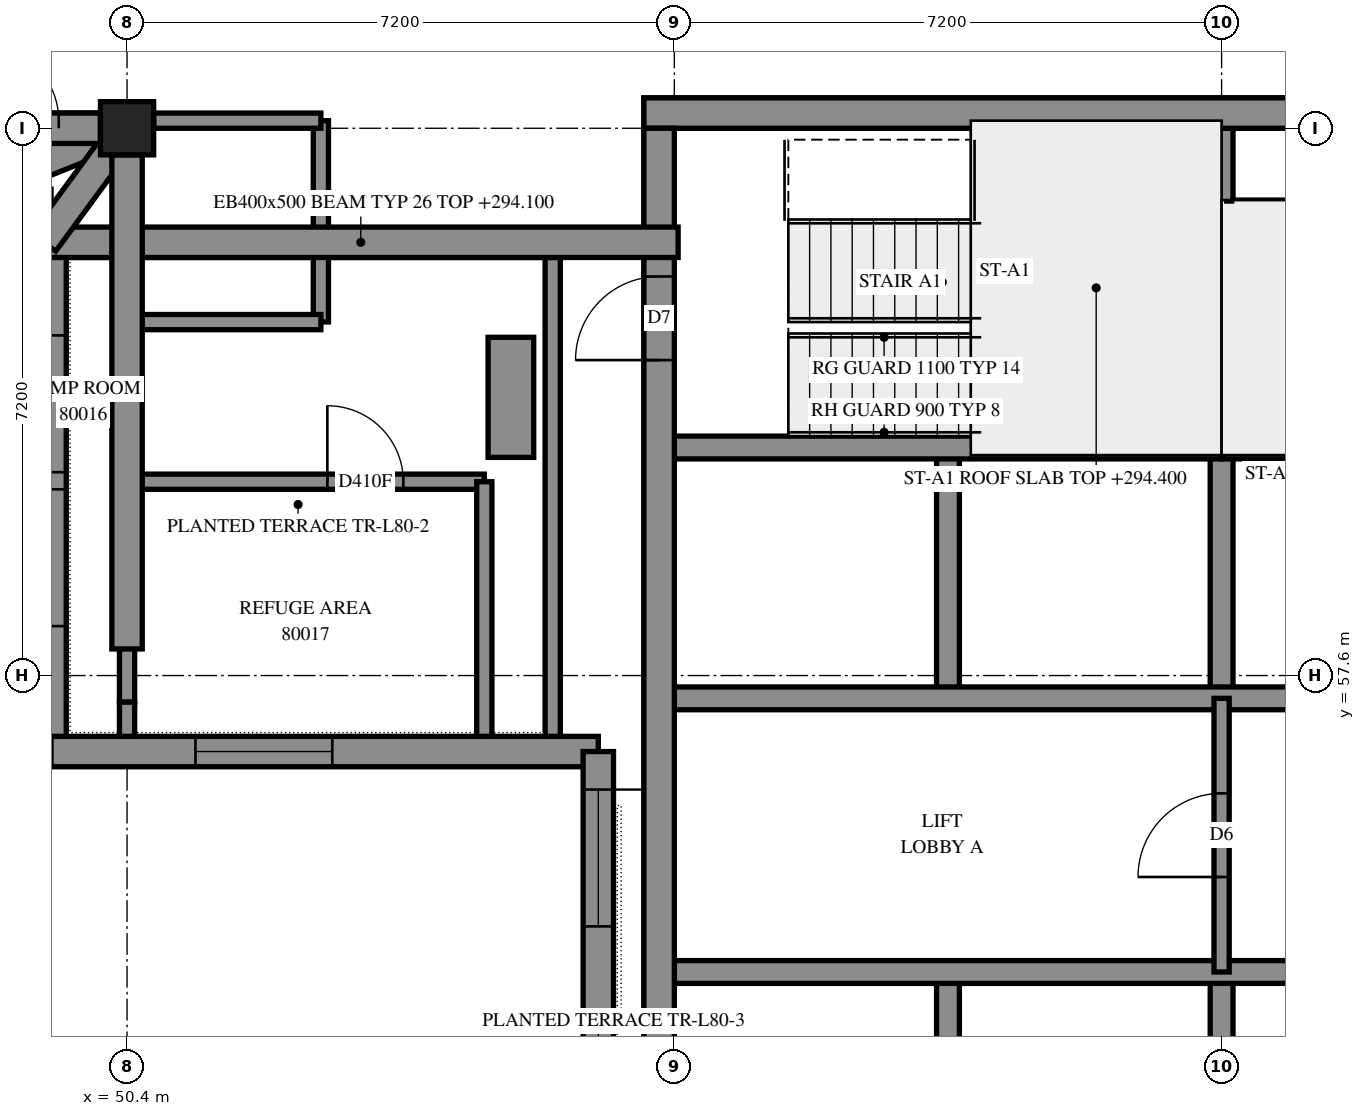
"""IFC4 building model, lengths in metres.
Left out: names, types, materials, properties, quantities, classifications, styles, units other than length and angle.
Written with IfcOpenShell. Run it as: python <this file> out.ifc"""

import sys

from ifc_helpers import new_model, si_unit, direction, frame, frame_2d, origin, origin_2d, place, context, subcontext, project, spatial, polyline, rectangle, outline, extrude, element, fill, save


model = new_model("IFC4")
c1 = context("Model", 3, precision=1e-05, world=origin(), true_north=direction((0.0, 1.0)))
c2 = subcontext(c1, "Body", "Model", "MODEL_VIEW")
j1 = project(units=[si_unit("LENGTHUNIT", "METRE"), si_unit("PLANEANGLEUNIT", "RADIAN")], contexts=[c1])
p1 = place(None, origin())
s1 = spatial("IfcSite", under=j1, at=p1, CompositionType="ELEMENT")
p2 = place(p1, origin())
s2 = spatial("IfcBuilding", under=s1, at=p2, CompositionType="ELEMENT")
p3 = place(p2, frame((0.0, 0.0, 294.4)))
s3 = spatial("IfcBuildingStorey", under=s2, at=p3, CompositionType="ELEMENT", Elevation=294.4)
p4 = place(p3, frame((50.4, 64.8, 0.0), z_axis=(0.0, 0.0, 1.0), x_axis=(1.0, 0.0, 0.0)))
e1 = element("IfcColumn", 1, at=p4, inside=s3, PredefinedType="COLUMN", context=c2, shape_type="SweptSolid", body=[
    extrude(rectangle(XDim=0.7, YDim=0.7, at=origin_2d()), origin(), (0.0, 0.0, 1.0), 3.5),
])
p5 = place(p3, frame((57.2, 65.0, -0.3), z_axis=(0.0, 0.0, 1.0), x_axis=(1.0, 0.0, 0.0)))
e2 = element("IfcWall", 2, at=p5, inside=s3, PredefinedType="SHEAR", context=c2, shape_type="SweptSolid", body=[
    extrude(outline(polyline([(0.0, 0.0), (15.2, 0.0), (15.2, 3.1), (0.0, 3.1), (0.0, 0.0)])), frame((0.0, 0.2, 0.0), z_axis=(0.0, -1.0, 0.0), x_axis=(1.0, 0.0, 0.0)), (0.0, 0.0, 1.0), 0.4),
])
p6 = place(p5, frame((10.4, 0.0, 0.3)))
e3 = element("IfcOpeningElement", 3, at=p6, cuts=e2, PredefinedType="OPENING", context=c2, shape_type="SweptSolid", body=[
    extrude(rectangle(XDim=0.8, YDim=2.1, at=frame_2d((0.4, 1.05))), frame((0.0, 0.21, 0.0), z_axis=(0.0, -1.0, 0.0), x_axis=(1.0, 0.0, 0.0)), (0.0, 0.0, 1.0), 0.42),
])
p7 = place(p3, frame((57.4, 50.4, -0.3), z_axis=(0.0, 0.0, 1.0), x_axis=(0.0, 1.0, 0.0)))
e4 = element("IfcWall", 4, at=p7, inside=s3, PredefinedType="SHEAR", context=c2, shape_type="SweptSolid", body=[
    extrude(outline(polyline([(0.0, 0.0), (14.4, 0.0), (14.4, 3.1), (0.0, 3.1), (0.0, 0.0)])), frame((0.0, 0.2, 0.0), z_axis=(0.0, -1.0, 0.0), x_axis=(1.0, 0.0, 0.0)), (0.0, 0.0, 1.0), 0.4),
])
p8 = place(p7, frame((11.35, 0.0, 0.3)))
e5 = element("IfcOpeningElement", 5, at=p8, cuts=e4, PredefinedType="OPENING", context=c2, shape_type="SweptSolid", body=[
    extrude(rectangle(XDim=1.1, YDim=2.1, at=frame_2d((0.55, 1.05))), frame((0.0, 0.21, 0.0), z_axis=(0.0, -1.0, 0.0), x_axis=(1.0, 0.0, 0.0)), (0.0, 0.0, 1.0), 0.42),
])
for number, where, z_axis, x_axis in (
    (6, (61.2, 50.4, 0.0), (0.0, 0.0, 1.0), (0.0, 1.0, 0.0)),
    (7, (61.2, 57.3, 0.0), (0.0, 0.0, 1.0), (0.0, 1.0, 0.0)),
    (8, (64.8, 50.4, 0.0), (0.0, 0.0, 1.0), (0.0, 1.0, 0.0)),
    (9, (64.8, 57.3, 0.0), (0.0, 0.0, 1.0), (0.0, 1.0, 0.0)),
):
    element("IfcWall", number, at=place(p3, frame(where, z_axis=z_axis, x_axis=x_axis)), inside=s3, PredefinedType="SOLIDWALL", context=c2, shape_type="SweptSolid", body=[
        extrude(outline(polyline([(0.0, 0.0), (3.3, 0.0), (3.3, 3.5), (0.0, 3.5), (0.0, 0.0)])), frame((0.0, 0.15, 0.0), z_axis=(0.0, -1.0, 0.0), x_axis=(1.0, 0.0, 0.0)), (0.0, 0.0, 1.0), 0.3),
    ])
p9 = place(p3, frame((57.6, 53.7, 0.0), z_axis=(0.0, 0.0, 1.0), x_axis=(1.0, 0.0, 0.0)))
e10 = element("IfcWall", 10, at=p9, inside=s3, PredefinedType="SOLIDWALL", context=c2, shape_type="SweptSolid", body=[
    extrude(outline(polyline([(0.0, 0.0), (14.4, 0.0), (14.4, 3.5), (0.0, 3.5), (0.0, 0.0)])), frame((0.0, 0.15, 0.0), z_axis=(0.0, -1.0, 0.0), x_axis=(1.0, 0.0, 0.0)), (0.0, 0.0, 1.0), 0.3),
])
p10 = place(p9, frame((12.05, 0.0, 0.0)))
e11 = element("IfcOpeningElement", 11, at=p10, cuts=e10, PredefinedType="OPENING", context=c2, shape_type="SweptSolid", body=[
    extrude(rectangle(XDim=1.1, YDim=2.1, at=frame_2d((0.55, 1.05))), frame((0.0, 0.16, 0.0), z_axis=(0.0, -1.0, 0.0), x_axis=(1.0, 0.0, 0.0)), (0.0, 0.0, 1.0), 0.32),
])
p11 = place(p3, frame((57.6, 57.3, 0.0), z_axis=(0.0, 0.0, 1.0), x_axis=(1.0, 0.0, 0.0)))
e12 = element("IfcWall", 12, at=p11, inside=s3, PredefinedType="SOLIDWALL", context=c2, shape_type="SweptSolid", body=[
    extrude(outline(polyline([(0.0, 0.0), (14.4, 0.0), (14.4, 3.5), (0.0, 3.5), (0.0, 0.0)])), frame((0.0, 0.15, 0.0), z_axis=(0.0, -1.0, 0.0), x_axis=(1.0, 0.0, 0.0)), (0.0, 0.0, 1.0), 0.3),
])
p12 = place(p11, frame((12.05, 0.0, 0.0)))
e13 = element("IfcOpeningElement", 13, at=p12, cuts=e12, PredefinedType="OPENING", context=c2, shape_type="SweptSolid", body=[
    extrude(rectangle(XDim=1.1, YDim=2.1, at=frame_2d((0.55, 1.05))), frame((0.0, 0.16, 0.0), z_axis=(0.0, -1.0, 0.0), x_axis=(1.0, 0.0, 0.0)), (0.0, 0.0, 1.0), 0.32),
])
for number, where, z_axis, x_axis in (
    (14, (57.6, 60.6, 0.0), (0.0, 0.0, 1.0), (1.0, 0.0, 0.0)),
    (15, (64.8, 60.6, 0.0), (0.0, 0.0, 1.0), (1.0, 0.0, 0.0)),
):
    element("IfcWall", number, at=place(p3, frame(where, z_axis=z_axis, x_axis=x_axis)), inside=s3, PredefinedType="SOLIDWALL", context=c2, shape_type="SweptSolid", body=[
        extrude(outline(polyline([(0.0, 0.0), (7.2, 0.0), (7.2, 3.5), (0.0, 3.5), (0.0, 0.0)])), frame((0.0, 0.15, 0.0), z_axis=(0.0, -1.0, 0.0), x_axis=(1.0, 0.0, 0.0)), (0.0, 0.0, 1.0), 0.3),
    ])
p13 = place(p3, frame((64.8, 60.6, 0.0), z_axis=(0.0, 0.0, 1.0), x_axis=(0.0, 1.0, 0.0)))
e16 = element("IfcWall", 16, at=p13, inside=s3, PredefinedType="SOLIDWALL", context=c2, shape_type="SweptSolid", body=[
    extrude(outline(polyline([(0.0, 0.0), (4.2, 0.0), (4.2, 3.5), (0.0, 3.5), (0.0, 0.0)])), frame((0.0, 0.15, 0.0), z_axis=(0.0, -1.0, 0.0), x_axis=(1.0, 0.0, 0.0)), (0.0, 0.0, 1.0), 0.3),
])
p14 = place(p3, frame((40.967, 63.8, 0.0), z_axis=(0.0, 0.0, 1.0), x_axis=(1.0, 0.0, 0.0)))
e17 = element("IfcWall", 17, at=p14, inside=s3, PredefinedType="SOLIDWALL", context=c2, shape_type="SweptSolid", body=[
    extrude(outline(polyline([(-0.2, -0.2), (8.233, -0.2), (8.633, 0.2), (0.2, 0.2), (-0.2, -0.2)])), origin(), (0.0, 0.0, 1.0), 3.5),
])
p15 = place(p14, frame((3.283, 0.0, 0.7)))
e18 = element("IfcOpeningElement", 18, at=p15, cuts=e17, PredefinedType="OPENING", context=c2, shape_type="SweptSolid", body=[
    extrude(rectangle(XDim=1.8, YDim=2.2, at=frame_2d((0.9, 1.1))), frame((0.0, 0.21, 0.0), z_axis=(0.0, -1.0, 0.0), x_axis=(1.0, 0.0, 0.0)), (0.0, 0.0, 1.0), 0.42),
])
p16 = place(p14, frame((6.133, 0.0, 0.7)))
e19 = element("IfcOpeningElement", 19, at=p16, cuts=e17, PredefinedType="OPENING", context=c2, shape_type="SweptSolid", body=[
    extrude(rectangle(XDim=1.8, YDim=2.2, at=frame_2d((0.9, 1.1))), frame((0.0, 0.21, 0.0), z_axis=(0.0, -1.0, 0.0), x_axis=(1.0, 0.0, 0.0)), (0.0, 0.0, 1.0), 0.42),
])
p17 = place(p3, frame((49.4, 63.8, 0.0), z_axis=(0.0, 0.0, 1.0), x_axis=(0.0, -1.0, 0.0)))
e20 = element("IfcWall", 20, at=p17, inside=s3, PredefinedType="SOLIDWALL", context=c2, shape_type="SweptSolid", body=[
    extrude(outline(polyline([(0.2, -0.2), (7.4, -0.2), (7.0, 0.2), (-0.2, 0.2), (0.2, -0.2)])), origin(), (0.0, 0.0, 1.0), 3.5),
])
p18 = place(p17, frame((3.75, 0.0, 0.7)))
e21 = element("IfcOpeningElement", 21, at=p18, cuts=e20, PredefinedType="OPENING", context=c2, shape_type="SweptSolid", body=[
    extrude(rectangle(XDim=1.8, YDim=2.2, at=frame_2d((0.9, 1.1))), frame((0.0, 0.21, 0.0), z_axis=(0.0, -1.0, 0.0), x_axis=(1.0, 0.0, 0.0)), (0.0, 0.0, 1.0), 0.42),
])
p19 = place(p17, frame((1.725, 0.0, 0.7)))
e22 = element("IfcOpeningElement", 22, at=p19, cuts=e20, PredefinedType="OPENING", context=c2, shape_type="SweptSolid", body=[
    extrude(rectangle(XDim=1.8, YDim=2.2, at=frame_2d((0.9, 1.1))), frame((0.0, 0.21, 0.0), z_axis=(0.0, -1.0, 0.0), x_axis=(1.0, 0.0, 0.0)), (0.0, 0.0, 1.0), 0.42),
])
p20 = place(p3, frame((49.4, 56.6, 0.0), z_axis=(0.0, 0.0, 1.0), x_axis=(1.0, 0.0, 0.0)))
e23 = element("IfcWall", 23, at=p20, inside=s3, PredefinedType="SOLIDWALL", context=c2, shape_type="SweptSolid", body=[
    extrude(outline(polyline([(-0.2, -0.2), (7.0, -0.2), (7.0, 0.2), (0.2, 0.2), (-0.2, -0.2)])), origin(), (0.0, 0.0, 1.0), 3.5),
])
p21 = place(p20, frame((1.9, 0.0, 0.7)))
e24 = element("IfcOpeningElement", 24, at=p21, cuts=e23, PredefinedType="OPENING", context=c2, shape_type="SweptSolid", body=[
    extrude(rectangle(XDim=1.8, YDim=2.2, at=frame_2d((0.9, 1.1))), frame((0.0, 0.21, 0.0), z_axis=(0.0, -1.0, 0.0), x_axis=(1.0, 0.0, 0.0)), (0.0, 0.0, 1.0), 0.42),
])
p22 = place(p3, frame((56.6, 56.6, 0.0), z_axis=(0.0, 0.0, 1.0), x_axis=(0.0, -1.0, 0.0)))
e25 = element("IfcWall", 25, at=p22, inside=s3, PredefinedType="SOLIDWALL", context=c2, shape_type="SweptSolid", body=[
    extrude(outline(polyline([(-0.2, -0.2), (7.4, -0.2), (7.0, 0.2), (-0.2, 0.2), (-0.2, -0.2)])), origin(), (0.0, 0.0, 1.0), 3.5),
])
p23 = place(p22, frame((0.5, 0.0, 0.7)))
e26 = element("IfcOpeningElement", 26, at=p23, cuts=e25, PredefinedType="OPENING", context=c2, shape_type="SweptSolid", body=[
    extrude(rectangle(XDim=1.8, YDim=2.2, at=frame_2d((0.9, 1.1))), frame((0.0, 0.21, 0.0), z_axis=(0.0, -1.0, 0.0), x_axis=(1.0, 0.0, 0.0)), (0.0, 0.0, 1.0), 0.42),
])
p24 = place(p22, frame((3.5, 0.0, 0.7)))
e27 = element("IfcOpeningElement", 27, at=p24, cuts=e25, PredefinedType="OPENING", context=c2, shape_type="SweptSolid", body=[
    extrude(rectangle(XDim=1.8, YDim=2.2, at=frame_2d((0.9, 1.1))), frame((0.0, 0.21, 0.0), z_axis=(0.0, -1.0, 0.0), x_axis=(1.0, 0.0, 0.0)), (0.0, 0.0, 1.0), 0.42),
])
p25 = place(p3, frame((56.0, 56.8, 0.0), z_axis=(0.0, 0.0, 1.0), x_axis=(0.0, 1.0, 0.0)))
e28 = element("IfcWall", 28, at=p25, inside=s3, PredefinedType="PARAPET", context=c2, shape_type="SweptSolid", body=[
    extrude(outline(polyline([(0.0, -0.1), (6.5, -0.1), (6.3, 0.1), (0.0, 0.1), (0.0, -0.1)])), origin(), (0.0, 0.0, 1.0), 0.25),
])
p26 = place(p3, frame((56.0, 63.2, 0.0), z_axis=(0.0, 0.0, 1.0), x_axis=(-1.0, 0.0, 0.0)))
e29 = element("IfcWall", 29, at=p26, inside=s3, PredefinedType="PARAPET", context=c2, shape_type="SweptSolid", body=[
    extrude(outline(polyline([(-0.1, -0.1), (6.4, -0.1), (6.4, 0.1), (0.1, 0.1), (-0.1, -0.1)])), origin(), (0.0, 0.0, 1.0), 0.25),
])
p27 = place(p3, frame((55.45, 60.47, 0.0), z_axis=(0.0, 0.0, 1.0), x_axis=(0.0, 1.0, 0.0)))
e30 = element("IfcWall", 30, at=p27, inside=s3, PredefinedType="SOLIDWALL", context=c2, shape_type="SweptSolid", body=[
    extrude(rectangle(XDim=1.58, YDim=0.6, at=frame_2d((0.79, 0.0))), origin(), (0.0, 0.0, 1.0), 0.65),
])
p28 = place(p3, frame((64.95, 63.78, 0.0), z_axis=(0.0, 0.0, 1.0), x_axis=(1.0, 0.0, 0.0)))
e31 = element("IfcWall", 31, at=p28, inside=s3, PredefinedType="PARTITIONING", context=c2, shape_type="SweptSolid", body=[
    extrude(outline(polyline([(0.0, 0.0), (6.9, 0.0), (6.9, 3.5), (0.0, 3.5), (0.0, 0.0)])), frame((0.0, 0.075, 0.0), z_axis=(0.0, -1.0, 0.0), x_axis=(1.0, 0.0, 0.0)), (0.0, 0.0, 1.0), 0.15),
])
p29 = place(p3, frame((64.8, 53.7, 0.0), z_axis=(0.0, 0.0, 1.0), x_axis=(0.0, 1.0, 0.0)))
e32 = element("IfcWall", 32, at=p29, inside=s3, PredefinedType="PARTITIONING", context=c2, shape_type="SweptSolid", body=[
    extrude(outline(polyline([(0.0, 0.0), (3.6, 0.0), (3.6, 3.5), (0.0, 3.5), (0.0, 0.0)])), frame((0.0, 0.1, 0.0), z_axis=(0.0, -1.0, 0.0), x_axis=(1.0, 0.0, 0.0)), (0.0, 0.0, 1.0), 0.2),
])
p30 = place(p29, frame((1.25, 0.0, 0.0)))
e33 = element("IfcOpeningElement", 33, at=p30, cuts=e32, PredefinedType="OPENING", context=c2, shape_type="SweptSolid", body=[
    extrude(rectangle(XDim=1.1, YDim=2.1, at=frame_2d((0.55, 1.05))), frame((0.0, 0.11, 0.0), z_axis=(0.0, -1.0, 0.0), x_axis=(1.0, 0.0, 0.0)), (0.0, 0.0, 1.0), 0.22),
])
p31 = place(p3, frame((43.55, 64.9, 0.0), z_axis=(0.0, 0.0, 1.0), x_axis=(1.0, 0.0, 0.0)))
e34 = element("IfcWall", 34, at=p31, inside=s3, PredefinedType="PARTITIONING", context=c2, shape_type="SweptSolid", body=[
    extrude(rectangle(XDim=7.2, YDim=0.2, at=frame_2d((3.6, 0.0))), origin(), (0.0, 0.0, 1.0), 3.5),
])
p32 = place(p31, frame((1.125, 0.0, 0.0)))
e35 = element("IfcOpeningElement", 35, at=p32, cuts=e34, PredefinedType="OPENING", context=c2, shape_type="SweptSolid", body=[
    extrude(rectangle(XDim=1.0, YDim=2.1, at=frame_2d((0.5, 1.05))), frame((0.0, 0.11, 0.0), z_axis=(0.0, -1.0, 0.0), x_axis=(1.0, 0.0, 0.0)), (0.0, 0.0, 1.0), 0.22),
])
p33 = place(p31, frame((4.952, 0.0, 0.0)))
e36 = element("IfcOpeningElement", 36, at=p33, cuts=e34, PredefinedType="OPENING", context=c2, shape_type="SweptSolid", body=[
    extrude(rectangle(XDim=1.0, YDim=2.1, at=frame_2d((0.5, 1.05))), frame((0.0, 0.11, 0.0), z_axis=(0.0, -1.0, 0.0), x_axis=(1.0, 0.0, 0.0)), (0.0, 0.0, 1.0), 0.22),
])
p34 = place(p3, frame((50.4, 60.15, 0.0), z_axis=(0.0, 0.0, 1.0), x_axis=(1.0, 0.0, 0.0)))
e37 = element("IfcWall", 37, at=p34, inside=s3, PredefinedType="PARTITIONING", context=c2, shape_type="SweptSolid", body=[
    extrude(rectangle(XDim=4.7, YDim=0.2, at=frame_2d((2.35, 0.0))), origin(), (0.0, 0.0, 1.0), 3.5),
])
p35 = place(p34, frame((2.635, 0.0, 0.0)))
e38 = element("IfcOpeningElement", 38, at=p35, cuts=e37, PredefinedType="OPENING", context=c2, shape_type="SweptSolid", body=[
    extrude(rectangle(XDim=1.0, YDim=2.1, at=frame_2d((0.5, 1.05))), frame((0.0, 0.11, 0.0), z_axis=(0.0, -1.0, 0.0), x_axis=(1.0, 0.0, 0.0)), (0.0, 0.0, 1.0), 0.22),
])
p36 = place(p3, frame((55.1, 56.8, 0.0), z_axis=(0.0, 0.0, 1.0), x_axis=(0.0, 1.0, 0.0)))
e39 = element("IfcWall", 39, at=p36, inside=s3, PredefinedType="PARTITIONING", context=c2, shape_type="SweptSolid", body=[
    extrude(rectangle(XDim=3.35, YDim=0.2, at=frame_2d((1.675, 0.0))), origin(), (0.0, 0.0, 1.0), 3.5),
])
p37 = place(p3, frame((52.95, 62.252, 0.0), z_axis=(0.0, 0.0, 1.0), x_axis=(0.0, 1.0, 0.0)))
e40 = element("IfcWall", 40, at=p37, inside=s3, PredefinedType="PARTITIONING", context=c2, shape_type="SweptSolid", body=[
    extrude(rectangle(XDim=2.648, YDim=0.2, at=frame_2d((1.324, 0.0))), origin(), (0.0, 0.0, 1.0), 3.5),
])
p38 = place(p3, frame((50.4, 62.25, 0.0), z_axis=(0.0, 0.0, 1.0), x_axis=(1.0, 0.0, 0.0)))
e41 = element("IfcWall", 41, at=p38, inside=s3, PredefinedType="PARTITIONING", context=c2, shape_type="SweptSolid", body=[
    extrude(rectangle(XDim=2.55, YDim=0.2, at=frame_2d((1.275, 0.0))), origin(), (0.0, 0.0, 1.0), 3.5),
])
p39 = place(p3, frame((50.75, 64.9, 0.0), z_axis=(0.0, 0.0, 1.0), x_axis=(1.0, 0.0, 0.0)))
e42 = element("IfcWall", 42, at=p39, inside=s3, PredefinedType="PARTITIONING", context=c2, shape_type="SweptSolid", body=[
    extrude(rectangle(XDim=2.2, YDim=0.2, at=frame_2d((1.1, 0.0))), origin(), (0.0, 0.0, 1.0), 3.5),
])
p40 = place(p3, frame((50.4, 57.25, 0.0), z_axis=(0.0, 0.0, 1.0), x_axis=(0.0, 1.0, 0.0)))
e43 = element("IfcWall", 43, at=p40, inside=s3, PredefinedType="PARTITIONING", context=c2, shape_type="SweptSolid", body=[
    extrude(rectangle(XDim=2.9, YDim=0.2, at=frame_2d((1.45, 0.0))), origin(), (0.0, 0.0, 1.0), 3.5),
])
p41 = place(p3, frame((50.4, 60.15, 0.0), z_axis=(0.0, 0.0, 1.0), x_axis=(0.0, 1.0, 0.0)))
e44 = element("IfcWall", 44, at=p41, inside=s3, PredefinedType="PARTITIONING", context=c2, shape_type="SweptSolid", body=[
    extrude(rectangle(XDim=2.1, YDim=0.2, at=frame_2d((1.05, 0.0))), origin(), (0.0, 0.0, 1.0), 3.5),
])
p42 = place(p3, frame((50.4, 56.8, 0.0), z_axis=(0.0, 0.0, 1.0), x_axis=(0.0, 1.0, 0.0)))
e45 = element("IfcWall", 45, at=p42, inside=s3, PredefinedType="PARTITIONING", context=c2, shape_type="SweptSolid", body=[
    extrude(outline(polyline([(0.0, -0.1), (0.45, -0.1), (0.45, 0.1), (0.0, 0.1), (0.0, -0.1)])), origin(), (0.0, 0.0, 1.0), 3.5),
])
p43 = place(p18, origin())
e46 = element("IfcWindow", 46, at=p43, inside=s3, PartitioningType="SINGLE_PANEL", PredefinedType="WINDOW", context=c2, shape_type="SweptSolid", body=[
    extrude(rectangle(XDim=1.8, YDim=2.2, at=frame_2d((0.9, 1.1))), frame((0.0, 0.08, 0.0), z_axis=(0.0, -1.0, 0.0), x_axis=(1.0, 0.0, 0.0)), (0.0, 0.0, 1.0), 0.06),
])
fill(e21, e46)
p44 = place(p21, origin())
e47 = element("IfcWindow", 47, at=p44, inside=s3, PartitioningType="SINGLE_PANEL", PredefinedType="WINDOW", context=c2, shape_type="SweptSolid", body=[
    extrude(rectangle(XDim=1.8, YDim=2.2, at=frame_2d((0.9, 1.1))), frame((0.0, 0.08, 0.0), z_axis=(0.0, -1.0, 0.0), x_axis=(1.0, 0.0, 0.0)), (0.0, 0.0, 1.0), 0.06),
])
fill(e24, e47)
p45 = place(p23, origin())
e48 = element("IfcWindow", 48, at=p45, inside=s3, PartitioningType="SINGLE_PANEL", PredefinedType="WINDOW", context=c2, shape_type="SweptSolid", body=[
    extrude(rectangle(XDim=1.8, YDim=2.2, at=frame_2d((0.9, 1.1))), frame((0.0, 0.08, 0.0), z_axis=(0.0, -1.0, 0.0), x_axis=(1.0, 0.0, 0.0)), (0.0, 0.0, 1.0), 0.06),
])
fill(e26, e48)
p46 = place(p24, origin())
e49 = element("IfcWindow", 49, at=p46, inside=s3, PartitioningType="SINGLE_PANEL", PredefinedType="WINDOW", context=c2, shape_type="SweptSolid", body=[
    extrude(rectangle(XDim=1.8, YDim=2.2, at=frame_2d((0.9, 1.1))), frame((0.0, 0.08, 0.0), z_axis=(0.0, -1.0, 0.0), x_axis=(1.0, 0.0, 0.0)), (0.0, 0.0, 1.0), 0.06),
])
fill(e27, e49)
p47 = place(p8, origin())
e50 = element("IfcDoor", 50, at=p47, inside=s3, OperationType="SINGLE_SWING_LEFT", PredefinedType="DOOR", context=c2, shape_type="SweptSolid", body=[
    extrude(rectangle(XDim=1.1, YDim=2.1, at=frame_2d((0.55, 1.05))), frame((0.0, 0.025, 0.0), z_axis=(0.0, -1.0, 0.0), x_axis=(1.0, 0.0, 0.0)), (0.0, 0.0, 1.0), 0.05),
])
fill(e5, e50)
p48 = place(p30, origin())
e51 = element("IfcDoor", 51, at=p48, inside=s3, OperationType="DOUBLE_DOOR_SINGLE_SWING", PredefinedType="DOOR", context=c2, shape_type="SweptSolid", body=[
    extrude(rectangle(XDim=1.1, YDim=2.1, at=frame_2d((0.55, 1.05))), frame((0.0, 0.025, 0.0), z_axis=(0.0, -1.0, 0.0), x_axis=(1.0, 0.0, 0.0)), (0.0, 0.0, 1.0), 0.05),
])
fill(e33, e51)
p49 = place(p33, origin())
e52 = element("IfcDoor", 52, at=p49, inside=s3, OperationType="SINGLE_SWING_RIGHT", PredefinedType="DOOR", context=c2, shape_type="SweptSolid", body=[
    extrude(rectangle(XDim=1.0, YDim=2.1, at=frame_2d((0.5, 1.05))), frame((0.0, 0.025, 0.0), z_axis=(0.0, -1.0, 0.0), x_axis=(1.0, 0.0, 0.0)), (0.0, 0.0, 1.0), 0.05),
])
fill(e36, e52)
p50 = place(p35, origin())
e53 = element("IfcDoor", 53, at=p50, inside=s3, OperationType="SINGLE_SWING_LEFT", PredefinedType="DOOR", context=c2, shape_type="SweptSolid", body=[
    extrude(rectangle(XDim=1.0, YDim=2.1, at=frame_2d((0.5, 1.05))), frame((0.0, 0.025, 0.0), z_axis=(0.0, -1.0, 0.0), x_axis=(1.0, 0.0, 0.0)), (0.0, 0.0, 1.0), 0.05),
])
fill(e38, e53)
p51 = place(p19, origin())
e54 = element("IfcWindow", 54, at=p51, inside=s3, PartitioningType="SINGLE_PANEL", PredefinedType="WINDOW", context=c2, shape_type="SweptSolid", body=[
    extrude(rectangle(XDim=1.8, YDim=2.2, at=frame_2d((0.9, 1.1))), frame((0.0, 0.08, 0.0), z_axis=(0.0, -1.0, 0.0), x_axis=(1.0, 0.0, 0.0)), (0.0, 0.0, 1.0), 0.06),
])
fill(e22, e54)
save(model, sys.argv[1])
